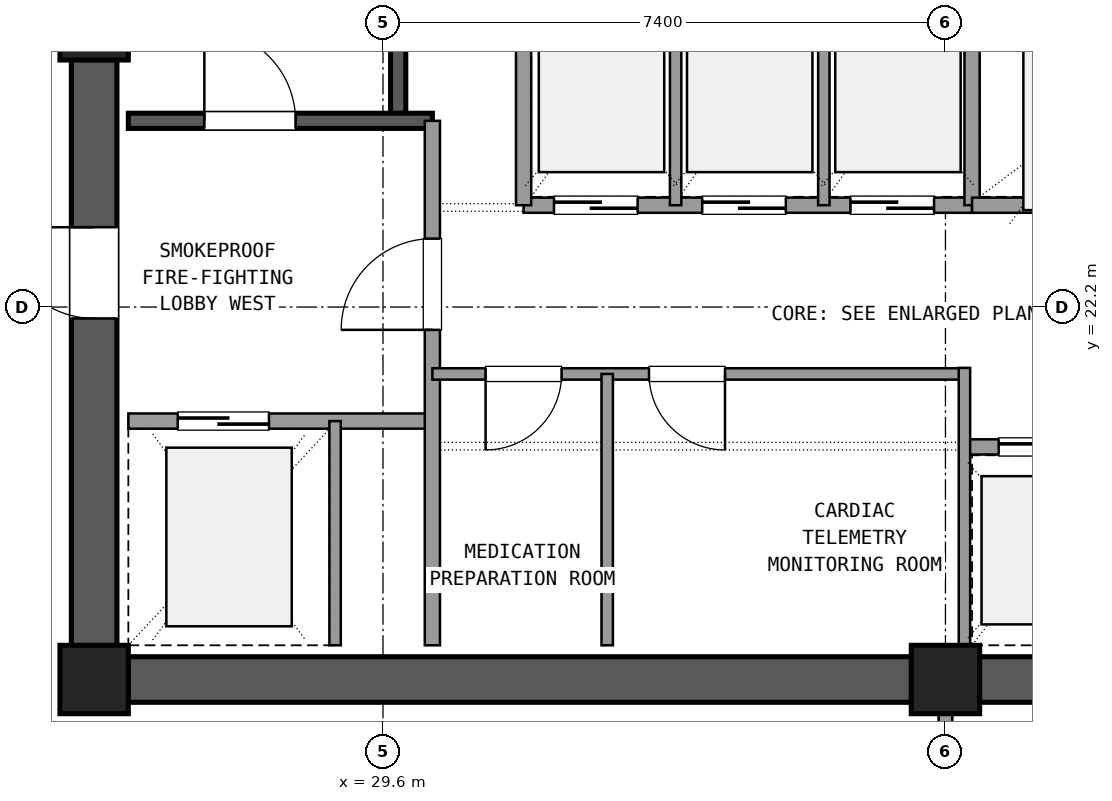
"""IFC4 building model, lengths in metres.
Left out: names, types, materials, properties, quantities, classifications, styles, units other than length and angle.
Written with IfcOpenShell. Run it as: python <this file> out.ifc"""

import sys

from ifc_helpers import new_model, si_unit, direction, frame, frame_2d, origin, origin_2d, place, context, subcontext, project, spatial, rectangle, extrude, element, fill, save


model = new_model("IFC4")
c1 = context("Model", 3, precision=1e-05, world=origin(), true_north=direction((0.0, 1.0)))
c2 = subcontext(c1, "Body", "Model", "MODEL_VIEW")
j1 = project(units=[si_unit("LENGTHUNIT", "METRE"), si_unit("PLANEANGLEUNIT", "RADIAN")], contexts=[c1])
p1 = place(None, origin())
s1 = spatial("IfcSite", under=j1, at=p1, CompositionType="ELEMENT")
p2 = place(p1, origin())
s2 = spatial("IfcBuilding", under=s1, at=p2, CompositionType="ELEMENT")
p3 = place(p2, frame((0.0, 0.0, 182.7)))
s3 = spatial("IfcBuildingStorey", under=s2, at=p3, CompositionType="ELEMENT", Elevation=182.7)
for number, where, z_axis, x_axis in (
    (1, (25.8, 17.3, 0.0), (0.0, 0.0, 1.0), (1.0, 0.0, 0.0)),
    (2, (37.0, 17.3, 0.0), (0.0, 0.0, 1.0), (1.0, 0.0, 0.0)),
    (3, (25.8, 25.9, 0.0), (0.0, 0.0, 1.0), (1.0, 0.0, 0.0)),
):
    element("IfcColumn", number, at=place(p3, frame(where, z_axis=z_axis, x_axis=x_axis)), inside=s3, PredefinedType="COLUMN", context=c2, shape_type="SweptSolid", body=[
        extrude(rectangle(XDim=0.9, YDim=0.9, at=origin_2d()), origin(), (0.0, 0.0, 1.0), 5.76),
    ])
for number, where, z_axis, x_axis in (
    (4, (26.245, 17.3, 0.0), (0.0, 0.0, 1.0), (1.0, 0.0, 0.0)),
    (5, (37.445, 17.3, 0.0), (0.0, 0.0, 1.0), (1.0, 0.0, 0.0)),
):
    element("IfcWall", number, at=place(p3, frame(where, z_axis=z_axis, x_axis=x_axis)), inside=s3, PredefinedType="SHEAR", context=c2, shape_type="SweptSolid", body=[
        extrude(rectangle(XDim=10.31, YDim=0.6, at=frame_2d((5.155, 0.0))), origin(), (0.0, 0.0, 1.0), 5.46),
    ])
p4 = place(p3, frame((25.8, 25.455, 0.0), z_axis=(0.0, 0.0, 1.0), x_axis=(0.0, -1.0, 0.0)))
e6 = element("IfcWall", 6, at=p4, inside=s3, PredefinedType="SHEAR", context=c2, shape_type="SweptSolid", body=[
    extrude(rectangle(XDim=7.71, YDim=0.6, at=frame_2d((3.855, 0.0))), origin(), (0.0, 0.0, 1.0), 5.46),
])
p5 = place(p4, frame((2.205, 0.0, 0.0)))
e7 = element("IfcOpeningElement", 7, at=p5, cuts=e6, PredefinedType="OPENING", context=c2, shape_type="SweptSolid", body=[
    extrude(rectangle(XDim=1.2, YDim=2.15, at=frame_2d((0.6, 1.075))), frame((0.0, 0.31, 0.0), z_axis=(0.0, -1.0, 0.0), x_axis=(1.0, 0.0, 0.0)), (0.0, 0.0, 1.0), 0.62),
])
p6 = place(p3, frame((29.8, 24.65, 0.0), z_axis=(0.0, 0.0, 1.0), x_axis=(0.0, 1.0, 0.0)))
e8 = element("IfcWall", 8, at=p6, inside=s3, PredefinedType="SHEAR", context=c2, shape_type="SweptSolid", body=[
    extrude(rectangle(XDim=9.4, YDim=0.2, at=frame_2d((4.7, 0.0))), origin(), (0.0, 0.0, 1.0), 5.46),
])
p7 = place(p3, frame((26.25, 24.65, 0.0), z_axis=(0.0, 0.0, 1.0), x_axis=(1.0, 0.0, 0.0)))
e9 = element("IfcWall", 9, at=p7, inside=s3, PredefinedType="SHEAR", context=c2, shape_type="SweptSolid", body=[
    extrude(rectangle(XDim=4.0, YDim=0.2, at=frame_2d((2.0, 0.0))), origin(), (0.0, 0.0, 1.0), 5.46),
])
p8 = place(p7, frame((1.0, 0.0, 0.0)))
e10 = element("IfcOpeningElement", 10, at=p8, cuts=e9, PredefinedType="OPENING", context=c2, shape_type="SweptSolid", body=[
    extrude(rectangle(XDim=1.2, YDim=2.15, at=frame_2d((0.6, 1.075))), frame((0.0, 0.11, 0.0), z_axis=(0.0, -1.0, 0.0), x_axis=(1.0, 0.0, 0.0)), (0.0, 0.0, 1.0), 0.22),
])
p9 = place(p3, frame((26.25, 20.7, 0.0), z_axis=(0.0, 0.0, 1.0), x_axis=(1.0, 0.0, 0.0)))
e11 = element("IfcWall", 11, at=p9, inside=s3, PredefinedType="SOLIDWALL", context=c2, shape_type="SweptSolid", body=[
    extrude(rectangle(XDim=4.0, YDim=0.2, at=frame_2d((2.0, 0.0))), origin(), (0.0, 0.0, 1.0), 4.37),
])
p10 = place(p9, frame((0.65, 0.0, 0.0)))
e12 = element("IfcOpeningElement", 12, at=p10, cuts=e11, PredefinedType="OPENING", context=c2, shape_type="SweptSolid", body=[
    extrude(rectangle(XDim=1.2, YDim=2.15, at=frame_2d((0.6, 1.075))), frame((0.0, 0.11, 0.0), z_axis=(0.0, -1.0, 0.0), x_axis=(1.0, 0.0, 0.0)), (0.0, 0.0, 1.0), 0.22),
])
p11 = place(p3, frame((30.25, 17.75, 0.0), z_axis=(0.0, 0.0, 1.0), x_axis=(0.0, 1.0, 0.0)))
e13 = element("IfcWall", 13, at=p11, inside=s3, PredefinedType="SOLIDWALL", context=c2, shape_type="SweptSolid", body=[
    extrude(rectangle(XDim=6.9, YDim=0.2, at=frame_2d((3.45, 0.0))), origin(), (0.0, 0.0, 1.0), 4.37),
])
p12 = place(p11, frame((4.15, 0.0, 0.0)))
e14 = element("IfcOpeningElement", 14, at=p12, cuts=e13, PredefinedType="OPENING", context=c2, shape_type="SweptSolid", body=[
    extrude(rectangle(XDim=1.2, YDim=2.15, at=frame_2d((0.6, 1.075))), frame((0.0, 0.11, 0.0), z_axis=(0.0, -1.0, 0.0), x_axis=(1.0, 0.0, 0.0)), (0.0, 0.0, 1.0), 0.22),
])
p13 = place(p3, frame((28.97, 17.75, 0.0), z_axis=(0.0, 0.0, 1.0), x_axis=(0.0, 1.0, 0.0)))
e15 = element("IfcWall", 15, at=p13, inside=s3, PredefinedType="PARTITIONING", context=c2, shape_type="SweptSolid", body=[
    extrude(rectangle(XDim=2.95, YDim=0.15, at=frame_2d((1.475, 0.0))), origin(), (0.0, 0.0, 1.0), 4.37),
])
p14 = place(p3, frame((30.25, 21.32, 0.0), z_axis=(0.0, 0.0, 1.0), x_axis=(1.0, 0.0, 0.0)))
e16 = element("IfcWall", 16, at=p14, inside=s3, PredefinedType="PARTITIONING", context=c2, shape_type="SweptSolid", body=[
    extrude(rectangle(XDim=7.0, YDim=0.15, at=frame_2d((3.5, 0.0))), origin(), (0.0, 0.0, 1.0), 4.37),
])
p15 = place(p14, frame((0.7, 0.0, 0.0)))
e17 = element("IfcOpeningElement", 17, at=p15, cuts=e16, PredefinedType="OPENING", context=c2, shape_type="SweptSolid", body=[
    extrude(rectangle(XDim=1.0, YDim=2.15, at=frame_2d((0.5, 1.075))), frame((0.0, 0.085, 0.0), z_axis=(0.0, -1.0, 0.0), x_axis=(1.0, 0.0, 0.0)), (0.0, 0.0, 1.0), 0.17),
])
p16 = place(p14, frame((2.85, 0.0, 0.0)))
e18 = element("IfcOpeningElement", 18, at=p16, cuts=e16, PredefinedType="OPENING", context=c2, shape_type="SweptSolid", body=[
    extrude(rectangle(XDim=1.0, YDim=2.15, at=frame_2d((0.5, 1.075))), frame((0.0, 0.085, 0.0), z_axis=(0.0, -1.0, 0.0), x_axis=(1.0, 0.0, 0.0)), (0.0, 0.0, 1.0), 0.17),
])
p17 = place(p3, frame((32.55, 17.75, 0.0), z_axis=(0.0, 0.0, 1.0), x_axis=(0.0, 1.0, 0.0)))
e19 = element("IfcWall", 19, at=p17, inside=s3, PredefinedType="PARTITIONING", context=c2, shape_type="SweptSolid", body=[
    extrude(rectangle(XDim=3.57, YDim=0.15, at=frame_2d((1.785, 0.0))), origin(), (0.0, 0.0, 1.0), 4.37),
])
p18 = place(p3, frame((37.25, 20.36, 0.0), z_axis=(0.0, 0.0, 1.0), x_axis=(1.0, 0.0, 0.0)))
e20 = element("IfcWall", 20, at=p18, inside=s3, PredefinedType="SOLIDWALL", context=c2, shape_type="SweptSolid", body=[
    extrude(rectangle(XDim=6.1, YDim=0.2, at=frame_2d((3.05, 0.0))), origin(), (0.0, 0.0, 1.0), 4.37),
])
p19 = place(p18, frame((0.45, 0.0, 0.0)))
e21 = element("IfcOpeningElement", 21, at=p19, cuts=e20, PredefinedType="OPENING", context=c2, shape_type="SweptSolid", body=[
    extrude(rectangle(XDim=1.1, YDim=2.15, at=frame_2d((0.55, 1.075))), frame((0.0, 0.11, 0.0), z_axis=(0.0, -1.0, 0.0), x_axis=(1.0, 0.0, 0.0)), (0.0, 0.0, 1.0), 0.22),
])
p20 = place(p18, frame((2.5, 0.0, 0.0)))
e22 = element("IfcOpeningElement", 22, at=p20, cuts=e20, PredefinedType="OPENING", context=c2, shape_type="SweptSolid", body=[
    extrude(rectangle(XDim=1.1, YDim=2.15, at=frame_2d((0.55, 1.075))), frame((0.0, 0.11, 0.0), z_axis=(0.0, -1.0, 0.0), x_axis=(1.0, 0.0, 0.0)), (0.0, 0.0, 1.0), 0.22),
])
p21 = place(p18, frame((4.55, 0.0, 0.0)))
e23 = element("IfcOpeningElement", 23, at=p21, cuts=e20, PredefinedType="OPENING", context=c2, shape_type="SweptSolid", body=[
    extrude(rectangle(XDim=1.1, YDim=2.15, at=frame_2d((0.55, 1.075))), frame((0.0, 0.11, 0.0), z_axis=(0.0, -1.0, 0.0), x_axis=(1.0, 0.0, 0.0)), (0.0, 0.0, 1.0), 0.22),
])
p22 = place(p3, frame((37.25, 17.75, 0.0), z_axis=(0.0, 0.0, 1.0), x_axis=(0.0, 1.0, 0.0)))
e24 = element("IfcWall", 24, at=p22, inside=s3, PredefinedType="PARTITIONING", context=c2, shape_type="SweptSolid", body=[
    extrude(rectangle(XDim=3.65, YDim=0.15, at=frame_2d((1.825, 0.0))), origin(), (0.0, 0.0, 1.0), 4.37),
])
p23 = place(p3, frame((31.45, 23.54, 0.0), z_axis=(0.0, 0.0, 1.0), x_axis=(1.0, 0.0, 0.0)))
e25 = element("IfcWall", 25, at=p23, inside=s3, PredefinedType="SOLIDWALL", context=c2, shape_type="SweptSolid", body=[
    extrude(rectangle(XDim=5.9, YDim=0.2, at=frame_2d((2.95, 0.0))), origin(), (0.0, 0.0, 1.0), 4.37),
])
p24 = place(p23, frame((0.4, 0.0, 0.0)))
e26 = element("IfcOpeningElement", 26, at=p24, cuts=e25, PredefinedType="OPENING", context=c2, shape_type="SweptSolid", body=[
    extrude(rectangle(XDim=1.1, YDim=2.15, at=frame_2d((0.55, 1.075))), frame((0.0, 0.11, 0.0), z_axis=(0.0, -1.0, 0.0), x_axis=(1.0, 0.0, 0.0)), (0.0, 0.0, 1.0), 0.22),
])
p25 = place(p23, frame((2.35, 0.0, 0.0)))
e27 = element("IfcOpeningElement", 27, at=p25, cuts=e25, PredefinedType="OPENING", context=c2, shape_type="SweptSolid", body=[
    extrude(rectangle(XDim=1.1, YDim=2.15, at=frame_2d((0.55, 1.075))), frame((0.0, 0.11, 0.0), z_axis=(0.0, -1.0, 0.0), x_axis=(1.0, 0.0, 0.0)), (0.0, 0.0, 1.0), 0.22),
])
p26 = place(p23, frame((4.3, 0.0, 0.0)))
e28 = element("IfcOpeningElement", 28, at=p26, cuts=e25, PredefinedType="OPENING", context=c2, shape_type="SweptSolid", body=[
    extrude(rectangle(XDim=1.1, YDim=2.15, at=frame_2d((0.55, 1.075))), frame((0.0, 0.11, 0.0), z_axis=(0.0, -1.0, 0.0), x_axis=(1.0, 0.0, 0.0)), (0.0, 0.0, 1.0), 0.22),
])
p27 = place(p3, frame((31.45, 23.54, 0.0), z_axis=(0.0, 0.0, 1.0), x_axis=(0.0, 1.0, 0.0)))
e29 = element("IfcWall", 29, at=p27, inside=s3, PredefinedType="SOLIDWALL", context=c2, shape_type="SweptSolid", body=[
    extrude(rectangle(XDim=2.81, YDim=0.2, at=frame_2d((1.405, 0.0))), origin(), (0.0, 0.0, 1.0), 4.37),
])
for number, where, z_axis, x_axis in (
    (30, (33.45, 23.54, 0.0), (0.0, 0.0, 1.0), (0.0, 1.0, 0.0)),
    (31, (35.4, 23.54, 0.0), (0.0, 0.0, 1.0), (0.0, 1.0, 0.0)),
):
    element("IfcWall", number, at=place(p3, frame(where, z_axis=z_axis, x_axis=x_axis)), inside=s3, PredefinedType="PARTITIONING", context=c2, shape_type="SweptSolid", body=[
        extrude(rectangle(XDim=2.81, YDim=0.15, at=frame_2d((1.405, 0.0))), origin(), (0.0, 0.0, 1.0), 4.37),
    ])
p28 = place(p3, frame((37.35, 23.54, 0.0), z_axis=(0.0, 0.0, 1.0), x_axis=(0.0, 1.0, 0.0)))
e32 = element("IfcWall", 32, at=p28, inside=s3, PredefinedType="SOLIDWALL", context=c2, shape_type="SweptSolid", body=[
    extrude(rectangle(XDim=6.82, YDim=0.2, at=frame_2d((3.41, 0.0))), origin(), (0.0, 0.0, 1.0), 4.37),
])
p29 = place(p3, frame((37.35, 23.54, 0.0), z_axis=(0.0, 0.0, 1.0), x_axis=(1.0, 0.0, 0.0)))
e33 = element("IfcWall", 33, at=p29, inside=s3, PredefinedType="SOLIDWALL", context=c2, shape_type="SweptSolid", body=[
    extrude(rectangle(XDim=3.05, YDim=0.2, at=frame_2d((1.525, 0.0))), origin(), (0.0, 0.0, 1.0), 4.37),
])
p30 = place(p3, frame((37.0, 14.29, 0.0), z_axis=(0.0, 0.0, 1.0), x_axis=(0.0, 1.0, 0.0)))
e34 = element("IfcWall", 34, at=p30, inside=s3, PredefinedType="PARTITIONING", context=c2, shape_type="SweptSolid", body=[
    extrude(rectangle(XDim=2.56, YDim=0.18, at=frame_2d((1.28, 0.0))), origin(), (0.0, 0.0, 1.0), 4.37),
])
p31 = place(p30, frame((0.28, 0.0, 0.0)))
e35 = element("IfcOpeningElement", 35, at=p31, cuts=e34, PredefinedType="OPENING", context=c2, shape_type="SweptSolid", body=[
    extrude(rectangle(XDim=2.0, YDim=2.2, at=frame_2d((1.0, 1.1))), frame((0.0, 0.1, 0.0), z_axis=(0.0, -1.0, 0.0), x_axis=(1.0, 0.0, 0.0)), (0.0, 0.0, 1.0), 0.2),
])
p32 = place(p8, origin())
e36 = element("IfcDoor", 36, at=p32, inside=s3, OperationType="SINGLE_SWING_LEFT", PredefinedType="DOOR", context=c2, shape_type="SweptSolid", body=[
    extrude(rectangle(XDim=1.2, YDim=2.15, at=frame_2d((0.6, 1.075))), frame((0.0, 0.025, 0.0), z_axis=(0.0, -1.0, 0.0), x_axis=(1.0, 0.0, 0.0)), (0.0, 0.0, 1.0), 0.05),
])
fill(e10, e36)
p33 = place(p10, origin())
e37 = element("IfcDoor", 37, at=p33, inside=s3, OperationType="SLIDING_TO_LEFT", PredefinedType="DOOR", context=c2, shape_type="SweptSolid", body=[
    extrude(rectangle(XDim=1.2, YDim=2.15, at=frame_2d((0.6, 1.075))), frame((0.0, 0.025, 0.0), z_axis=(0.0, -1.0, 0.0), x_axis=(1.0, 0.0, 0.0)), (0.0, 0.0, 1.0), 0.05),
])
fill(e12, e37)
p34 = place(p12, origin())
e38 = element("IfcDoor", 38, at=p34, inside=s3, OperationType="SINGLE_SWING_LEFT", PredefinedType="DOOR", context=c2, shape_type="SweptSolid", body=[
    extrude(rectangle(XDim=1.2, YDim=2.15, at=frame_2d((0.6, 1.075))), frame((0.0, 0.025, 0.0), z_axis=(0.0, -1.0, 0.0), x_axis=(1.0, 0.0, 0.0)), (0.0, 0.0, 1.0), 0.05),
])
fill(e14, e38)
p35 = place(p5, frame((1.2, 0.0, 0.0), z_axis=(0.0, 0.0, 1.0), x_axis=(-1.0, 0.0, 0.0)))
e39 = element("IfcDoor", 39, at=p35, inside=s3, OperationType="SINGLE_SWING_LEFT", PredefinedType="DOOR", context=c2, shape_type="SweptSolid", body=[
    extrude(rectangle(XDim=1.2, YDim=2.15, at=frame_2d((0.6, 1.075))), frame((0.0, 0.025, 0.0), z_axis=(0.0, -1.0, 0.0), x_axis=(1.0, 0.0, 0.0)), (0.0, 0.0, 1.0), 0.05),
])
fill(e7, e39)
p36 = place(p15, frame((1.0, 0.0, 0.0), z_axis=(0.0, 0.0, 1.0), x_axis=(-1.0, 0.0, 0.0)))
e40 = element("IfcDoor", 40, at=p36, inside=s3, OperationType="SINGLE_SWING_LEFT", PredefinedType="DOOR", context=c2, shape_type="SweptSolid", body=[
    extrude(rectangle(XDim=1.0, YDim=2.15, at=frame_2d((0.5, 1.075))), frame((0.0, 0.025, 0.0), z_axis=(0.0, -1.0, 0.0), x_axis=(1.0, 0.0, 0.0)), (0.0, 0.0, 1.0), 0.05),
])
fill(e17, e40)
p37 = place(p16, frame((1.0, 0.0, 0.0), z_axis=(0.0, 0.0, 1.0), x_axis=(-1.0, 0.0, 0.0)))
e41 = element("IfcDoor", 41, at=p37, inside=s3, OperationType="SINGLE_SWING_RIGHT", PredefinedType="DOOR", context=c2, shape_type="SweptSolid", body=[
    extrude(rectangle(XDim=1.0, YDim=2.15, at=frame_2d((0.5, 1.075))), frame((0.0, 0.025, 0.0), z_axis=(0.0, -1.0, 0.0), x_axis=(1.0, 0.0, 0.0)), (0.0, 0.0, 1.0), 0.05),
])
fill(e18, e41)
p38 = place(p19, origin())
e42 = element("IfcDoor", 42, at=p38, inside=s3, OperationType="SLIDING_TO_LEFT", PredefinedType="DOOR", context=c2, shape_type="SweptSolid", body=[
    extrude(rectangle(XDim=1.1, YDim=2.15, at=frame_2d((0.55, 1.075))), frame((0.0, 0.025, 0.0), z_axis=(0.0, -1.0, 0.0), x_axis=(1.0, 0.0, 0.0)), (0.0, 0.0, 1.0), 0.05),
])
fill(e21, e42)
p39 = place(p24, origin())
e43 = element("IfcDoor", 43, at=p39, inside=s3, OperationType="SLIDING_TO_RIGHT", PredefinedType="DOOR", context=c2, shape_type="SweptSolid", body=[
    extrude(rectangle(XDim=1.1, YDim=2.15, at=frame_2d((0.55, 1.075))), frame((0.0, 0.025, 0.0), z_axis=(0.0, -1.0, 0.0), x_axis=(1.0, 0.0, 0.0)), (0.0, 0.0, 1.0), 0.05),
])
fill(e26, e43)
p40 = place(p25, origin())
e44 = element("IfcDoor", 44, at=p40, inside=s3, OperationType="SLIDING_TO_RIGHT", PredefinedType="DOOR", context=c2, shape_type="SweptSolid", body=[
    extrude(rectangle(XDim=1.1, YDim=2.15, at=frame_2d((0.55, 1.075))), frame((0.0, 0.025, 0.0), z_axis=(0.0, -1.0, 0.0), x_axis=(1.0, 0.0, 0.0)), (0.0, 0.0, 1.0), 0.05),
])
fill(e27, e44)
p41 = place(p26, origin())
e45 = element("IfcDoor", 45, at=p41, inside=s3, OperationType="SLIDING_TO_RIGHT", PredefinedType="DOOR", context=c2, shape_type="SweptSolid", body=[
    extrude(rectangle(XDim=1.1, YDim=2.15, at=frame_2d((0.55, 1.075))), frame((0.0, 0.025, 0.0), z_axis=(0.0, -1.0, 0.0), x_axis=(1.0, 0.0, 0.0)), (0.0, 0.0, 1.0), 0.05),
])
fill(e28, e45)
save(model, sys.argv[1])
